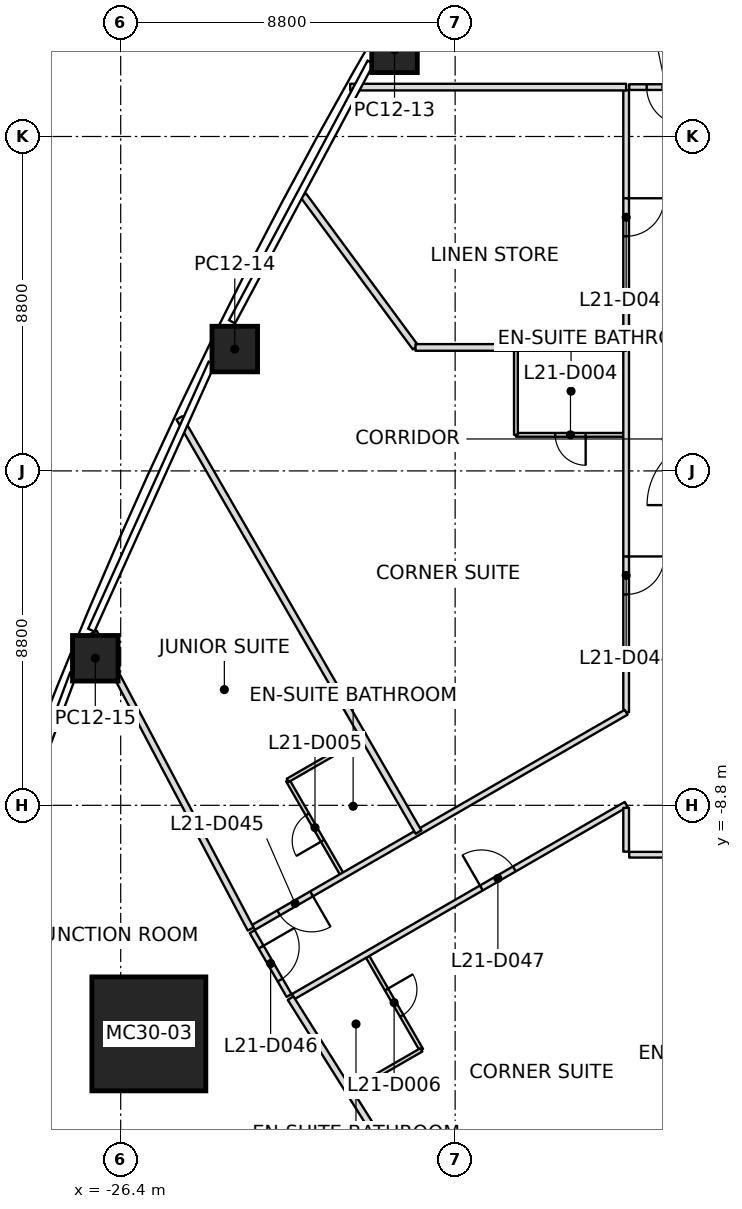
"""IFC4 building model, lengths in metres.
Left out: names, types, materials, properties, quantities, classifications, styles, units other than length and angle.
Written with IfcOpenShell. Run it as: python <this file> out.ifc"""

import sys

from ifc_helpers import new_model, si_unit, direction, frame, frame_2d, origin, origin_2d, place, context, subcontext, project, spatial, rectangle, extrude, element, fill, save


model = new_model("IFC4")
c1 = context("Model", 3, precision=1e-05, world=origin(), true_north=direction((0.0, 1.0)))
c2 = subcontext(c1, "Body", "Model", "MODEL_VIEW")
j1 = project(units=[si_unit("LENGTHUNIT", "METRE"), si_unit("PLANEANGLEUNIT", "RADIAN")], contexts=[c1])
p1 = place(None, origin())
s1 = spatial("IfcSite", under=j1, at=p1, CompositionType="ELEMENT")
p2 = place(p1, origin())
s2 = spatial("IfcBuilding", under=s1, at=p2, CompositionType="ELEMENT")
p3 = place(p2, frame((0.0, 0.0, 99.8)))
s3 = spatial("IfcBuildingStorey", under=s2, at=p3, CompositionType="ELEMENT", Elevation=99.8)
p4 = place(p3, frame((-25.659, -14.814, 0.0), z_axis=(0.030466109479, 0.017607037296, 0.999380712447), x_axis=(0.999535800346, -0.000536667047, -0.03046138236)))
e1 = element("IfcColumn", 1, at=p4, inside=s3, PredefinedType="COLUMN", context=c2, shape_type="SweptSolid", body=[
    extrude(rectangle(XDim=3.0, YDim=3.0, at=origin_2d()), origin(), (0.0, 0.0, 1.0), 3.702),
])
p5 = place(p3, frame((-19.195, 11.082, 0.0), z_axis=(0.010688729499, -0.00613612249, 0.999924046647), x_axis=(0.49997143695, 0.866041893524, -2.9922579e-05)))
e2 = element("IfcColumn", 2, at=p5, inside=s3, PredefinedType="COLUMN", context=c2, shape_type="SweptSolid", body=[
    extrude(rectangle(XDim=1.2, YDim=1.2, at=origin_2d()), origin(), (0.0, 0.0, 1.0), 3.7),
])
p6 = place(p3, frame((-23.398, 3.207, 0.0), z_axis=(0.015306644787, 0.002309192102, 0.99988017995), x_axis=(0.441219239516, 0.897355932776, -0.008826811034)))
e3 = element("IfcColumn", 3, at=p6, inside=s3, PredefinedType="COLUMN", context=c2, shape_type="SweptSolid", body=[
    extrude(rectangle(XDim=1.2, YDim=1.2, at=origin_2d()), origin(), (0.0, 0.0, 1.0), 3.7),
])
p7 = place(p3, frame((-27.069, -4.93, 0.0), z_axis=(0.019394711647, 0.011016723963, 0.999751207528), x_axis=(0.380514646556, 0.924607960976, -0.017570493934)))
e4 = element("IfcColumn", 4, at=p7, inside=s3, PredefinedType="COLUMN", context=c2, shape_type="SweptSolid", body=[
    extrude(rectangle(XDim=1.2, YDim=1.2, at=origin_2d()), origin(), (0.0, 0.0, 1.0), 3.701),
])
p8 = place(p3, frame((-22.98, -12.055, 0.0), z_axis=(0.0, 0.0, 1.0), x_axis=(-0.467349289871, 0.884072757898, 0.0)))
e5 = element("IfcWall", 5, at=p8, inside=s3, PredefinedType="PARTITIONING", context=c2, shape_type="SweptSolid", body=[
    extrude(rectangle(XDim=8.835, YDim=0.175, at=frame_2d((4.417, 0.0))), origin(), (0.0, 0.0, 1.0), 3.0),
])
p9 = place(p3, frame((-18.563, -9.505, 0.0), z_axis=(0.0, 0.0, 1.0), x_axis=(-0.500006767202, 0.866021496703, 0.0)))
e6 = element("IfcWall", 6, at=p9, inside=s3, PredefinedType="PARTITIONING", context=c2, shape_type="SweptSolid", body=[
    extrude(rectangle(XDim=12.587, YDim=0.175, at=frame_2d((6.293, 0.0))), origin(), (0.0, 0.0, 1.0), 2.934),
])
p10 = place(p3, frame((-17.23, -21.355, 0.0), z_axis=(0.0, 0.0, 1.0), x_axis=(-0.53194005048, 0.846782016044, 0.0)))
e7 = element("IfcWall", 7, at=p10, inside=s3, PredefinedType="PARTITIONING", context=c2, shape_type="SweptSolid", body=[
    extrude(rectangle(XDim=8.834, YDim=0.175, at=frame_2d((4.417, 0.0))), origin(), (0.0, 0.0, 1.0), 3.0),
])
p11 = place(p3, frame((-21.596, 7.252, 0.0), z_axis=(0.0, 0.0, 1.0), x_axis=(0.593731264, -0.804663399285, 0.0)))
e8 = element("IfcWall", 8, at=p11, inside=s3, PredefinedType="PARTITIONING", context=c2, shape_type="SweptSolid", body=[
    extrude(rectangle(XDim=4.975, YDim=0.175, at=frame_2d((2.487, 0.0))), origin(), (0.0, 0.0, 1.0), 2.934),
])
p12 = place(p3, frame((-18.643, 3.249, 0.0), z_axis=(0.0, 0.0, 1.0), x_axis=(1.0, 0.0, 0.0)))
e9 = element("IfcWall", 9, at=p12, inside=s3, PredefinedType="PARTITIONING", context=c2, shape_type="SweptSolid", body=[
    extrude(rectangle(XDim=5.542, YDim=0.175, at=frame_2d((2.771, 0.0))), origin(), (0.0, 0.0, 1.0), 3.0),
])
p13 = place(p3, frame((-13.1, 10.1, 0.0), z_axis=(0.0, 0.0, 1.0), x_axis=(-1.0, 0.0, 0.0)))
e10 = element("IfcWall", 10, at=p13, inside=s3, PredefinedType="PARTITIONING", context=c2, shape_type="SweptSolid", body=[
    extrude(rectangle(XDim=7.262, YDim=0.175, at=frame_2d((3.631, 0.0))), origin(), (0.0, 0.0, 1.0), 2.934),
])
p14 = place(p3, frame((-22.94, -12.124, 0.0), z_axis=(0.0, 0.0, 1.0), x_axis=(0.499969367985, -0.866043088465, 0.0)))
e11 = element("IfcWall", 11, at=p14, inside=s3, PredefinedType="PARTITIONING", context=c2, shape_type="SweptSolid", body=[
    extrude(rectangle(XDim=1.94, YDim=0.15, at=frame_2d((0.97, 0.0))), origin(), (0.0, 0.0, 1.0), 2.797),
])
p15 = place(p14, frame((0.47, 0.0, 0.0)))
e12 = element("IfcOpeningElement", 12, at=p15, cuts=e11, PredefinedType="OPENING", context=c2, shape_type="SweptSolid", body=[
    extrude(rectangle(XDim=1.0, YDim=2.1, at=frame_2d((0.5, 1.05))), frame((0.0, 0.075, 0.0), z_axis=(0.0, -1.0, 0.0), x_axis=(1.0, 0.0, 0.0)), (0.0, 0.0, 1.0), 0.15),
])
p16 = place(p3, frame((-13.1, 10.02, 0.0), z_axis=(0.0, 0.0, 1.0), x_axis=(0.0, -1.0, 0.0)))
e13 = element("IfcWall", 13, at=p16, inside=s3, PredefinedType="PARTITIONING", context=c2, shape_type="SweptSolid", body=[
    extrude(rectangle(XDim=16.371, YDim=0.15, at=frame_2d((8.186, 0.0))), origin(), (0.0, 0.0, 1.0), 2.947),
])
p17 = place(p16, frame((2.845, 0.0, 0.0)))
e14 = element("IfcOpeningElement", 14, at=p17, cuts=e13, PredefinedType="OPENING", context=c2, shape_type="SweptSolid", body=[
    extrude(rectangle(XDim=1.0, YDim=2.1, at=frame_2d((0.5, 1.05))), frame((0.0, 0.075, 0.0), z_axis=(0.0, -1.0, 0.0), x_axis=(1.0, 0.0, 0.0)), (0.0, 0.0, 1.0), 0.15),
])
p18 = place(p16, frame((12.271, 0.0, 0.0)))
e15 = element("IfcOpeningElement", 15, at=p18, cuts=e13, PredefinedType="OPENING", context=c2, shape_type="SweptSolid", body=[
    extrude(rectangle(XDim=1.0, YDim=2.1, at=frame_2d((0.5, 1.05))), frame((0.0, 0.075, 0.0), z_axis=(0.0, -1.0, 0.0), x_axis=(1.0, 0.0, 0.0)), (0.0, 0.0, 1.0), 0.15),
])
p19 = place(p3, frame((-13.1, -6.351, 0.0), z_axis=(0.0, 0.0, 1.0), x_axis=(-0.866018341403, -0.500012232204, 0.0)))
e16 = element("IfcWall", 16, at=p19, inside=s3, PredefinedType="PARTITIONING", context=c2, shape_type="SweptSolid", body=[
    extrude(rectangle(XDim=11.328, YDim=0.15, at=frame_2d((5.664, 0.0))), origin(), (0.0, 0.0, 1.0), 2.947),
])
p20 = place(p19, frame((9.559, 0.0, 0.0)))
e17 = element("IfcOpeningElement", 17, at=p20, cuts=e16, PredefinedType="OPENING", context=c2, shape_type="SweptSolid", body=[
    extrude(rectangle(XDim=1.0, YDim=2.1, at=frame_2d((0.5, 1.05))), frame((0.0, 0.075, 0.0), z_axis=(0.0, -1.0, 0.0), x_axis=(1.0, 0.0, 0.0)), (0.0, 0.0, 1.0), 0.15),
])
p21 = place(p3, frame((-21.861, -13.834, 0.0), z_axis=(0.0, 0.0, 1.0), x_axis=(0.866015577098, 0.500017019934, 0.0)))
e18 = element("IfcWall", 18, at=p21, inside=s3, PredefinedType="PARTITIONING", context=c2, shape_type="SweptSolid", body=[
    extrude(rectangle(XDim=10.116, YDim=0.15, at=frame_2d((5.058, 0.0))), origin(), (0.0, 0.0, 1.0), 2.797),
])
p22 = place(p21, frame((5.718, 0.0, 0.0)))
e19 = element("IfcOpeningElement", 19, at=p22, cuts=e18, PredefinedType="OPENING", context=c2, shape_type="SweptSolid", body=[
    extrude(rectangle(XDim=1.0, YDim=2.1, at=frame_2d((0.5, 1.05))), frame((0.0, 0.075, 0.0), z_axis=(0.0, -1.0, 0.0), x_axis=(1.0, 0.0, 0.0)), (0.0, 0.0, 1.0), 0.15),
])
p23 = place(p3, frame((-13.1, -8.867, 0.0), z_axis=(0.0, 0.0, 1.0), x_axis=(0.0, -1.0, 0.0)))
e20 = element("IfcWall", 20, at=p23, inside=s3, PredefinedType="PARTITIONING", context=c2, shape_type="SweptSolid", body=[
    extrude(rectangle(XDim=1.153, YDim=0.15, at=frame_2d((0.576, 0.0))), origin(), (0.0, 0.0, 1.0), 2.797),
])
p24 = place(p3, frame((-13.02, -10.1, 0.0), z_axis=(0.0, 0.0, 1.0), x_axis=(1.0, 0.0, 0.0)))
e21 = element("IfcWall", 21, at=p24, inside=s3, PredefinedType="PARTITIONING", context=c2, shape_type="SweptSolid", body=[
    extrude(rectangle(XDim=26.04, YDim=0.15, at=frame_2d((13.02, 0.0))), origin(), (0.0, 0.0, 1.0), 2.867),
])
p25 = place(p24, frame((5.07, 0.0, 0.0)))
e22 = element("IfcOpeningElement", 22, at=p25, cuts=e21, PredefinedType="OPENING", context=c2, shape_type="SweptSolid", body=[
    extrude(rectangle(XDim=1.0, YDim=2.1, at=frame_2d((0.5, 1.05))), frame((0.0, 0.075, 0.0), z_axis=(0.0, -1.0, 0.0), x_axis=(1.0, 0.0, 0.0)), (0.0, 0.0, 1.0), 0.15),
])
p26 = place(p24, frame((9.87, 0.0, 0.0)))
e23 = element("IfcOpeningElement", 23, at=p26, cuts=e21, PredefinedType="OPENING", context=c2, shape_type="SweptSolid", body=[
    extrude(rectangle(XDim=1.0, YDim=2.1, at=frame_2d((0.5, 1.05))), frame((0.0, 0.075, 0.0), z_axis=(0.0, -1.0, 0.0), x_axis=(1.0, 0.0, 0.0)), (0.0, 0.0, 1.0), 0.15),
])
p27 = place(p24, frame((14.67, 0.0, 0.0)))
e24 = element("IfcOpeningElement", 24, at=p27, cuts=e21, PredefinedType="OPENING", context=c2, shape_type="SweptSolid", body=[
    extrude(rectangle(XDim=1.0, YDim=2.1, at=frame_2d((0.5, 1.05))), frame((0.0, 0.075, 0.0), z_axis=(0.0, -1.0, 0.0), x_axis=(1.0, 0.0, 0.0)), (0.0, 0.0, 1.0), 0.15),
])
p28 = place(p24, frame((19.47, 0.0, 0.0)))
e25 = element("IfcOpeningElement", 25, at=p28, cuts=e21, PredefinedType="OPENING", context=c2, shape_type="SweptSolid", body=[
    extrude(rectangle(XDim=1.0, YDim=2.1, at=frame_2d((0.5, 1.05))), frame((0.0, 0.075, 0.0), z_axis=(0.0, -1.0, 0.0), x_axis=(1.0, 0.0, 0.0)), (0.0, 0.0, 1.0), 0.15),
])
p29 = place(p24, frame((24.27, 0.0, 0.0)))
e26 = element("IfcOpeningElement", 26, at=p29, cuts=e21, PredefinedType="OPENING", context=c2, shape_type="SweptSolid", body=[
    extrude(rectangle(XDim=1.0, YDim=2.1, at=frame_2d((0.5, 1.05))), frame((0.0, 0.075, 0.0), z_axis=(0.0, -1.0, 0.0), x_axis=(1.0, 0.0, 0.0)), (0.0, 0.0, 1.0), 0.15),
])
p30 = place(p3, frame((-3.58, 10.1, 0.0), z_axis=(0.0, 0.0, 1.0), x_axis=(-1.0, 0.0, 0.0)))
e27 = element("IfcWall", 27, at=p30, inside=s3, PredefinedType="PARTITIONING", context=c2, shape_type="SweptSolid", body=[
    extrude(rectangle(XDim=9.44, YDim=0.15, at=frame_2d((4.72, 0.0))), origin(), (0.0, 0.0, 1.0), 2.947),
])
p31 = place(p30, frame((7.98, 0.0, 0.0)))
e28 = element("IfcOpeningElement", 28, at=p31, cuts=e27, PredefinedType="OPENING", context=c2, shape_type="SweptSolid", body=[
    extrude(rectangle(XDim=1.0, YDim=2.1, at=frame_2d((0.5, 1.05))), frame((0.0, 0.075, 0.0), z_axis=(0.0, -1.0, 0.0), x_axis=(1.0, 0.0, 0.0)), (0.0, 0.0, 1.0), 0.15),
])
p32 = place(p3, frame((-20.57, -10.629, 0.0), z_axis=(0.0, 0.0, 1.0), x_axis=(-0.499999802827, 0.866025517622, 0.0)))
e29 = element("IfcWall", 29, at=p32, inside=s3, PredefinedType="PARTITIONING", context=c2, shape_type="SweptSolid", body=[
    extrude(rectangle(XDim=2.87, YDim=0.1, at=frame_2d((1.435, 0.0))), origin(), (0.0, 0.0, 1.0), 3.0),
])
p33 = place(p32, frame((1.035, 0.0, 0.0)))
e30 = element("IfcOpeningElement", 30, at=p33, cuts=e29, PredefinedType="OPENING", context=c2, shape_type="SweptSolid", body=[
    extrude(rectangle(XDim=0.8, YDim=2.1, at=frame_2d((0.4, 1.05))), frame((0.0, 0.05, 0.0), z_axis=(0.0, -1.0, 0.0), x_axis=(1.0, 0.0, 0.0)), (0.0, 0.0, 1.0), 0.1),
])
p34 = place(p3, frame((-22.005, -8.144, 0.0), z_axis=(0.0, 0.0, 1.0), x_axis=(0.866017224141, 0.500014167291, 0.0)))
e31 = element("IfcWall", 31, at=p34, inside=s3, PredefinedType="PARTITIONING", context=c2, shape_type="SweptSolid", body=[
    extrude(rectangle(XDim=2.27, YDim=0.1, at=frame_2d((1.135, 0.0))), origin(), (0.0, 0.0, 1.0), 3.0),
])
p35 = place(p3, frame((-19.923, -12.75, 0.0), z_axis=(0.0, 0.0, 1.0), x_axis=(0.500036638401, -0.866004249561, 0.0)))
e32 = element("IfcWall", 32, at=p35, inside=s3, PredefinedType="PARTITIONING", context=c2, shape_type="SweptSolid", body=[
    extrude(rectangle(XDim=2.87, YDim=0.1, at=frame_2d((1.435, 0.0))), origin(), (0.0, 0.0, 1.0), 3.0),
])
p36 = place(p35, frame((1.035, 0.0, 0.0)))
e33 = element("IfcOpeningElement", 33, at=p36, cuts=e32, PredefinedType="OPENING", context=c2, shape_type="SweptSolid", body=[
    extrude(rectangle(XDim=0.8, YDim=2.1, at=frame_2d((0.4, 1.05))), frame((0.0, 0.05, 0.0), z_axis=(0.0, -1.0, 0.0), x_axis=(1.0, 0.0, 0.0)), (0.0, 0.0, 1.0), 0.1),
])
p37 = place(p3, frame((-18.488, -15.235, 0.0), z_axis=(0.0, 0.0, 1.0), x_axis=(-0.866044110172, -0.499967598186, 0.0)))
e34 = element("IfcWall", 34, at=p37, inside=s3, PredefinedType="PARTITIONING", context=c2, shape_type="SweptSolid", body=[
    extrude(rectangle(XDim=2.27, YDim=0.1, at=frame_2d((1.135, 0.0))), origin(), (0.0, 0.0, 1.0), 3.0),
])
p38 = place(p3, frame((-13.13, 0.949, 0.0), z_axis=(0.0, 0.0, 1.0), x_axis=(-1.0, 0.0, 0.0)))
e35 = element("IfcWall", 35, at=p38, inside=s3, PredefinedType="PARTITIONING", context=c2, shape_type="SweptSolid", body=[
    extrude(rectangle(XDim=2.87, YDim=0.1, at=frame_2d((1.435, 0.0))), origin(), (0.0, 0.0, 1.0), 3.0),
])
p39 = place(p38, frame((1.035, 0.0, 0.0)))
e36 = element("IfcOpeningElement", 36, at=p39, cuts=e35, PredefinedType="OPENING", context=c2, shape_type="SweptSolid", body=[
    extrude(rectangle(XDim=0.8, YDim=2.1, at=frame_2d((0.4, 1.05))), frame((0.0, 0.05, 0.0), z_axis=(0.0, -1.0, 0.0), x_axis=(1.0, 0.0, 0.0)), (0.0, 0.0, 1.0), 0.1),
])
p40 = place(p3, frame((-16.0, 0.949, 0.0), z_axis=(0.0, 0.0, 1.0), x_axis=(0.0, 1.0, 0.0)))
e37 = element("IfcWall", 37, at=p40, inside=s3, PredefinedType="PARTITIONING", context=c2, shape_type="SweptSolid", body=[
    extrude(rectangle(XDim=2.27, YDim=0.1, at=frame_2d((1.135, 0.0))), origin(), (0.0, 0.0, 1.0), 3.0),
])
p41 = place(p31, origin())
e38 = element("IfcDoor", 38, at=p41, inside=s3, OperationType="SINGLE_SWING_RIGHT", PredefinedType="DOOR", context=c2, shape_type="SweptSolid", body=[
    extrude(rectangle(XDim=1.0, YDim=2.1, at=frame_2d((0.5, 1.05))), frame((0.0, 0.025, 0.0), z_axis=(0.0, -1.0, 0.0), x_axis=(1.0, 0.0, 0.0)), (0.0, 0.0, 1.0), 0.05),
])
fill(e28, e38)
p42 = place(p17, origin())
e39 = element("IfcDoor", 39, at=p42, inside=s3, OperationType="SINGLE_SWING_LEFT", PredefinedType="DOOR", context=c2, shape_type="SweptSolid", body=[
    extrude(rectangle(XDim=1.0, YDim=2.1, at=frame_2d((0.5, 1.05))), frame((0.0, 0.025, 0.0), z_axis=(0.0, -1.0, 0.0), x_axis=(1.0, 0.0, 0.0)), (0.0, 0.0, 1.0), 0.05),
])
fill(e14, e39)
p43 = place(p18, origin())
e40 = element("IfcDoor", 40, at=p43, inside=s3, OperationType="SINGLE_SWING_LEFT", PredefinedType="DOOR", context=c2, shape_type="SweptSolid", body=[
    extrude(rectangle(XDim=1.0, YDim=2.1, at=frame_2d((0.5, 1.05))), frame((0.0, 0.025, 0.0), z_axis=(0.0, -1.0, 0.0), x_axis=(1.0, 0.0, 0.0)), (0.0, 0.0, 1.0), 0.05),
])
fill(e15, e40)
p44 = place(p39, origin())
e41 = element("IfcDoor", 41, at=p44, inside=s3, OperationType="SINGLE_SWING_LEFT", PredefinedType="DOOR", context=c2, shape_type="SweptSolid", body=[
    extrude(rectangle(XDim=0.8, YDim=2.1, at=frame_2d((0.4, 1.05))), frame((0.0, 0.025, 0.0), z_axis=(0.0, -1.0, 0.0), x_axis=(1.0, 0.0, 0.0)), (0.0, 0.0, 1.0), 0.05),
])
fill(e36, e41)
p45 = place(p20, origin())
e42 = element("IfcDoor", 42, at=p45, inside=s3, OperationType="SINGLE_SWING_LEFT", PredefinedType="DOOR", context=c2, shape_type="SweptSolid", body=[
    extrude(rectangle(XDim=1.0, YDim=2.1, at=frame_2d((0.5, 1.05))), frame((0.0, 0.025, 0.0), z_axis=(0.0, -1.0, 0.0), x_axis=(1.0, 0.0, 0.0)), (0.0, 0.0, 1.0), 0.05),
])
fill(e17, e42)
p46 = place(p33, origin())
e43 = element("IfcDoor", 43, at=p46, inside=s3, OperationType="SINGLE_SWING_LEFT", PredefinedType="DOOR", context=c2, shape_type="SweptSolid", body=[
    extrude(rectangle(XDim=0.8, YDim=2.1, at=frame_2d((0.4, 1.05))), frame((0.0, 0.025, 0.0), z_axis=(0.0, -1.0, 0.0), x_axis=(1.0, 0.0, 0.0)), (0.0, 0.0, 1.0), 0.05),
])
fill(e30, e43)
p47 = place(p15, origin())
e44 = element("IfcDoor", 44, at=p47, inside=s3, OperationType="SINGLE_SWING_LEFT", PredefinedType="DOOR", context=c2, shape_type="SweptSolid", body=[
    extrude(rectangle(XDim=1.0, YDim=2.1, at=frame_2d((0.5, 1.05))), frame((0.0, 0.025, 0.0), z_axis=(0.0, -1.0, 0.0), x_axis=(1.0, 0.0, 0.0)), (0.0, 0.0, 1.0), 0.05),
])
fill(e12, e44)
p48 = place(p22, origin())
e45 = element("IfcDoor", 45, at=p48, inside=s3, OperationType="SINGLE_SWING_LEFT", PredefinedType="DOOR", context=c2, shape_type="SweptSolid", body=[
    extrude(rectangle(XDim=1.0, YDim=2.1, at=frame_2d((0.5, 1.05))), frame((0.0, 0.025, 0.0), z_axis=(0.0, -1.0, 0.0), x_axis=(1.0, 0.0, 0.0)), (0.0, 0.0, 1.0), 0.05),
])
fill(e19, e45)
p49 = place(p36, origin())
e46 = element("IfcDoor", 46, at=p49, inside=s3, OperationType="SINGLE_SWING_LEFT", PredefinedType="DOOR", context=c2, shape_type="SweptSolid", body=[
    extrude(rectangle(XDim=0.8, YDim=2.1, at=frame_2d((0.4, 1.05))), frame((0.0, 0.025, 0.0), z_axis=(0.0, -1.0, 0.0), x_axis=(1.0, 0.0, 0.0)), (0.0, 0.0, 1.0), 0.05),
])
fill(e33, e46)
save(model, sys.argv[1])
